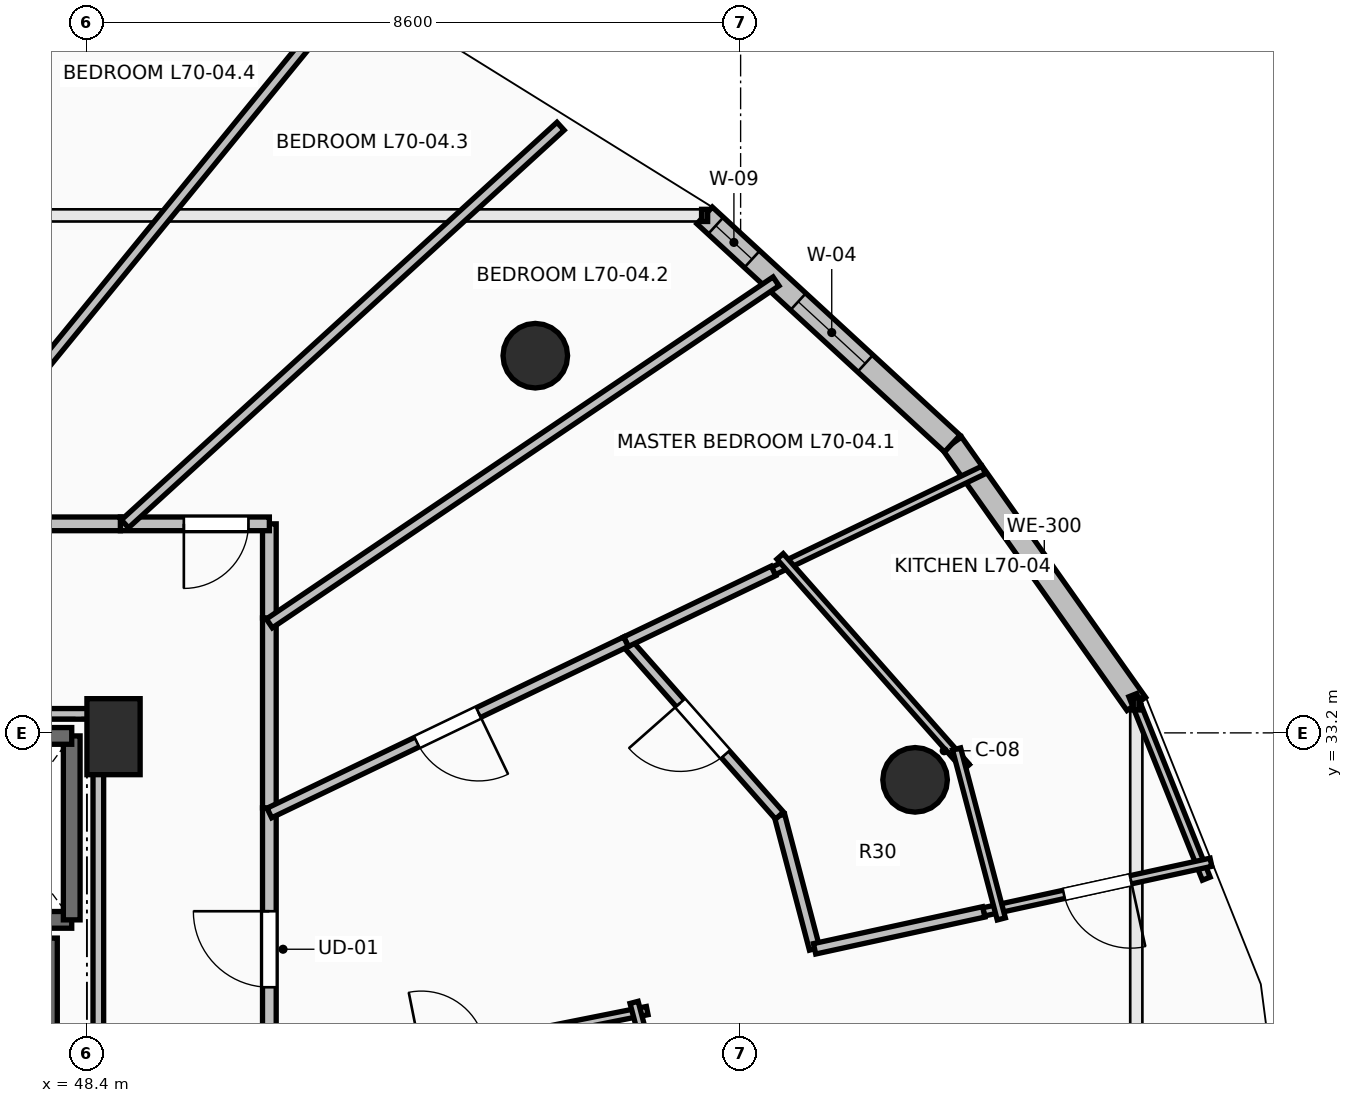
"""IFC4 building model, lengths in metres.
Left out: names, types, materials, properties, quantities, classifications, styles, units other than length and angle.
Written with IfcOpenShell. Run it as: python <this file> out.ifc"""

import sys

from ifc_helpers import new_model, si_unit, direction, frame, frame_2d, origin, origin_2d, place, context, subcontext, project, spatial, rectangle, circle, extrude, element, fill, save


model = new_model("IFC4")
c1 = context("Model", 3, precision=1e-05, world=origin(), true_north=direction((0.0, 1.0)))
c2 = subcontext(c1, "Body", "Model", "MODEL_VIEW")
j1 = project(units=[si_unit("LENGTHUNIT", "METRE"), si_unit("PLANEANGLEUNIT", "RADIAN")], contexts=[c1])
p1 = place(None, origin())
s1 = spatial("IfcSite", under=j1, at=p1, CompositionType="ELEMENT")
p2 = place(p1, origin())
s2 = spatial("IfcBuilding", under=s1, at=p2, CompositionType="ELEMENT")
p3 = place(p2, frame((0.0, 0.0, 259.1)))
s3 = spatial("IfcBuildingStorey", under=s2, at=p3, CompositionType="ELEMENT", Elevation=259.1)
for number, where, z_axis, x_axis in (
    (1, (59.295, 32.582, 0.0), (0.0, 0.0, 1.0), (0.924, 0.383, 0.0)),
    (2, (54.299, 38.162, 0.0), (0.0, 0.0, 1.0), (0.707, 0.707, 0.0)),
):
    element("IfcColumn", number, at=place(p3, frame(where, z_axis=z_axis, x_axis=x_axis)), inside=s3, PredefinedType="COLUMN", context=c2, shape_type="SweptSolid", body=[
        extrude(circle(Radius=0.425, at=origin_2d()), origin(), (0.0, 0.0, 1.0), 3.55),
    ])
p4 = place(p3, frame((48.75, 33.15, 0.0), z_axis=(0.0, 0.0, 1.0), x_axis=(1.0, 0.0, 0.0)))
e3 = element("IfcColumn", 3, at=p4, inside=s3, PredefinedType="PILASTER", context=c2, shape_type="SweptSolid", body=[
    extrude(rectangle(XDim=0.7, YDim=1.0, at=origin_2d()), origin(), (0.0, 0.0, 1.0), 3.55),
])
p5 = place(p3, frame((62.206, 33.581, 0.0), z_axis=(0.0, 0.0, 1.0), x_axis=(-0.577261247247, 0.816559521668, 0.0)))
e4 = element("IfcWall", 4, at=p5, inside=s3, PredefinedType="STANDARD", context=c2, shape_type="SweptSolid", body=[
    extrude(rectangle(XDim=4.194, YDim=0.3, at=frame_2d((2.097, 0.0))), origin(), (0.0, 0.0, 1.0), 3.29),
])
p6 = place(p3, frame((59.784, 37.006, 0.0), z_axis=(0.0, 0.0, 1.0), x_axis=(-0.735445373611, 0.677584018727, 0.0)))
e5 = element("IfcWall", 5, at=p6, inside=s3, PredefinedType="STANDARD", context=c2, shape_type="SweptSolid", body=[
    extrude(rectangle(XDim=4.43, YDim=0.3, at=frame_2d((2.215, 0.0))), origin(), (0.0, 0.0, 1.0), 3.29),
])
p7 = place(p6, frame((1.556, 0.0, 0.85)))
e6 = element("IfcOpeningElement", 6, at=p7, cuts=e5, PredefinedType="OPENING", context=c2, shape_type="SweptSolid", body=[
    extrude(rectangle(XDim=1.2, YDim=1.95, at=frame_2d((0.6, 0.975))), frame((0.0, 0.165, 0.0), z_axis=(0.0, -1.0, 0.0), x_axis=(1.0, 0.0, 0.0)), (0.0, 0.0, 1.0), 0.33),
])
p8 = place(p6, frame((3.581, 0.0, 0.85)))
e7 = element("IfcOpeningElement", 7, at=p8, cuts=e5, PredefinedType="OPENING", context=c2, shape_type="SweptSolid", body=[
    extrude(rectangle(XDim=0.65, YDim=1.8, at=frame_2d((0.325, 0.9))), frame((0.0, 0.165, 0.0), z_axis=(0.0, -1.0, 0.0), x_axis=(1.0, 0.0, 0.0)), (0.0, 0.0, 1.0), 0.33),
])
p9 = place(p3, frame((46.4, 30.74, 0.0), z_axis=(0.0, 0.0, 1.0), x_axis=(1.0, 0.0, 0.0)))
e8 = element("IfcWall", 8, at=p9, inside=s3, PredefinedType="SOLIDWALL", context=c2, shape_type="SweptSolid", body=[
    extrude(rectangle(XDim=1.8, YDim=0.22, at=frame_2d((0.9, 0.0))), origin(), (0.0, 0.0, 1.0), 3.29),
])
p10 = place(p3, frame((48.2, 30.74, 0.0), z_axis=(0.0, 0.0, 1.0), x_axis=(0.0, 1.0, 0.0)))
e9 = element("IfcWall", 9, at=p10, inside=s3, PredefinedType="SOLIDWALL", context=c2, shape_type="SweptSolid", body=[
    extrude(rectangle(XDim=2.42, YDim=0.22, at=frame_2d((1.21, 0.0))), origin(), (0.0, 0.0, 1.0), 3.29),
])
p11 = place(p3, frame((48.2, 33.16, 0.0), z_axis=(0.0, 0.0, 1.0), x_axis=(-1.0, 0.0, 0.0)))
e10 = element("IfcWall", 10, at=p11, inside=s3, PredefinedType="SOLIDWALL", context=c2, shape_type="SweptSolid", body=[
    extrude(rectangle(XDim=1.8, YDim=0.22, at=frame_2d((0.9, 0.0))), origin(), (0.0, 0.0, 1.0), 3.29),
])
p12 = place(p3, frame((47.9, 28.0, 0.0), z_axis=(0.0, 0.0, 1.0), x_axis=(0.0, 1.0, 0.0)))
e11 = element("IfcWall", 11, at=p12, inside=s3, PredefinedType="SHEAR", context=c2, shape_type="SweptSolid", body=[
    extrude(rectangle(XDim=2.5, YDim=0.22, at=frame_2d((1.25, 0.0))), origin(), (0.0, 0.0, 1.0), 3.29),
])
p13 = place(p3, frame((50.8, 28.494, 0.0), z_axis=(0.0, 0.0, 1.0), x_axis=(0.0, 1.0, 0.0)))
e12 = element("IfcWall", 12, at=p13, inside=s3, PredefinedType="PARTITIONING", context=c2, shape_type="SweptSolid", body=[
    extrude(rectangle(XDim=3.719, YDim=0.18, at=frame_2d((1.859, 0.0))), origin(), (0.0, 0.0, 1.0), 3.29),
])
p14 = place(p13, frame((1.36, 0.0, 0.0)))
e13 = element("IfcOpeningElement", 13, at=p14, cuts=e12, PredefinedType="OPENING", context=c2, shape_type="SweptSolid", body=[
    extrude(rectangle(XDim=1.0, YDim=2.15, at=frame_2d((0.5, 1.075))), frame((0.0, 0.105, 0.0), z_axis=(0.0, -1.0, 0.0), x_axis=(1.0, 0.0, 0.0)), (0.0, 0.0, 1.0), 0.21),
])
p15 = place(p3, frame((50.8, 32.213, 0.0), z_axis=(0.0, 0.0, 1.0), x_axis=(0.0, 1.0, 0.0)))
e14 = element("IfcWall", 14, at=p15, inside=s3, PredefinedType="PARTITIONING", context=c2, shape_type="SweptSolid", body=[
    extrude(rectangle(XDim=2.499, YDim=0.18, at=frame_2d((1.25, 0.0))), origin(), (0.0, 0.0, 1.0), 2.482),
])
p16 = place(p3, frame((50.8, 34.712, 0.0), z_axis=(0.0, 0.0, 1.0), x_axis=(0.0, 1.0, 0.0)))
e15 = element("IfcWall", 15, at=p16, inside=s3, PredefinedType="PARTITIONING", context=c2, shape_type="SweptSolid", body=[
    extrude(rectangle(XDim=1.238, YDim=0.18, at=frame_2d((0.619, 0.0))), origin(), (0.0, 0.0, 1.0), 2.482),
])
p17 = place(p3, frame((50.8, 35.95, 0.0), z_axis=(0.0, 0.0, 1.0), x_axis=(-1.0, 0.0, 0.0)))
e16 = element("IfcWall", 16, at=p17, inside=s3, PredefinedType="PARTITIONING", context=c2, shape_type="SweptSolid", body=[
    extrude(rectangle(XDim=1.96, YDim=0.18, at=frame_2d((0.98, 0.0))), origin(), (0.0, 0.0, 1.0), 2.936),
])
p18 = place(p17, frame((0.275, 0.0, 0.0)))
e17 = element("IfcOpeningElement", 17, at=p18, cuts=e16, PredefinedType="OPENING", context=c2, shape_type="SweptSolid", body=[
    extrude(rectangle(XDim=0.85, YDim=2.1, at=frame_2d((0.425, 1.05))), frame((0.0, 0.105, 0.0), z_axis=(0.0, -1.0, 0.0), x_axis=(1.0, 0.0, 0.0)), (0.0, 0.0, 1.0), 0.21),
])
p19 = place(p3, frame((48.84, 35.95, 0.0), z_axis=(0.0, 0.0, 1.0), x_axis=(-1.0, 0.0, 0.0)))
e18 = element("IfcWall", 18, at=p19, inside=s3, PredefinedType="PARTITIONING", context=c2, shape_type="SweptSolid", body=[
    extrude(rectangle(XDim=2.773, YDim=0.18, at=frame_2d((1.387, 0.0))), origin(), (0.0, 0.0, 1.0), 2.482),
])
p20 = place(p19, frame((0.961, 0.0, 0.0)))
e19 = element("IfcOpeningElement", 19, at=p20, cuts=e18, PredefinedType="OPENING", context=c2, shape_type="SweptSolid", body=[
    extrude(rectangle(XDim=0.85, YDim=2.1, at=frame_2d((0.425, 1.05))), frame((0.0, 0.105, 0.0), z_axis=(0.0, -1.0, 0.0), x_axis=(1.0, 0.0, 0.0)), (0.0, 0.0, 1.0), 0.21),
])
p21 = place(p3, frame((50.663, 28.527, 0.0), z_axis=(0.0, 0.0, 1.0), x_axis=(0.980652709614, 0.195755620935, 0.0)))
e20 = element("IfcWall", 20, at=p21, inside=s3, PredefinedType="PARTITIONING", context=c2, shape_type="SweptSolid", body=[
    extrude(rectangle(XDim=5.209, YDim=0.11, at=frame_2d((2.605, 0.0))), origin(), (0.0, 0.0, 1.0), 2.936),
])
p22 = place(p21, frame((2.18, 0.0, 0.0)))
e21 = element("IfcOpeningElement", 21, at=p22, cuts=e20, PredefinedType="OPENING", context=c2, shape_type="SweptSolid", body=[
    extrude(rectangle(XDim=0.85, YDim=2.1, at=frame_2d((0.425, 1.05))), frame((0.0, 0.07, 0.0), z_axis=(0.0, -1.0, 0.0), x_axis=(1.0, 0.0, 0.0)), (0.0, 0.0, 1.0), 0.14),
])
p23 = place(p3, frame((55.598, 29.654, 0.0), z_axis=(0.0, 0.0, 1.0), x_axis=(0.25449329928, -0.967074537263, 0.0)))
e22 = element("IfcWall", 22, at=p23, inside=s3, PredefinedType="PARTITIONING", context=c2, shape_type="SweptSolid", body=[
    extrude(rectangle(XDim=3.919, YDim=0.11, at=frame_2d((1.959, 0.0))), origin(), (0.0, 0.0, 1.0), 2.482),
])
p24 = place(p3, frame((57.432, 35.33, 0.0), z_axis=(0.0, 0.0, 1.0), x_axis=(0.90133305384, 0.43312668592, 0.0)))
e23 = element("IfcWall", 23, at=p24, inside=s3, PredefinedType="PARTITIONING", context=c2, shape_type="SweptSolid", body=[
    extrude(rectangle(XDim=3.069, YDim=0.11, at=frame_2d((1.535, 0.0))), origin(), (0.0, 0.0, 1.0), 3.29),
])
p25 = place(p3, frame((63.126, 31.282, 0.0), z_axis=(0.0, 0.0, 1.0), x_axis=(-0.371940924939, 0.92825640227, 0.0)))
e24 = element("IfcWall", 24, at=p25, inside=s3, PredefinedType="PARTITIONING", context=c2, shape_type="SweptSolid", body=[
    extrude(rectangle(XDim=2.601, YDim=0.11, at=frame_2d((1.3, 0.0))), origin(), (0.0, 0.0, 1.0), 3.29),
])
p26 = place(p3, frame((63.188, 31.498, 0.0), z_axis=(0.0, 0.0, 1.0), x_axis=(-0.976993096252, -0.213270930688, 0.0)))
e25 = element("IfcWall", 25, at=p26, inside=s3, PredefinedType="PARTITIONING", context=c2, shape_type="SweptSolid", body=[
    extrude(rectangle(XDim=3.06, YDim=0.11, at=frame_2d((1.53, 0.0))), origin(), (0.0, 0.0, 1.0), 3.29),
])
p27 = place(p26, frame((1.08, 0.0, 0.0)))
e26 = element("IfcOpeningElement", 26, at=p27, cuts=e25, PredefinedType="OPENING", context=c2, shape_type="SweptSolid", body=[
    extrude(rectangle(XDim=0.9, YDim=2.1, at=frame_2d((0.45, 1.05))), frame((0.0, 0.07, 0.0), z_axis=(0.0, -1.0, 0.0), x_axis=(1.0, 0.0, 0.0)), (0.0, 0.0, 1.0), 0.14),
])
p28 = place(p3, frame((57.973, 30.359, 0.0), z_axis=(0.0, 0.0, 1.0), x_axis=(-0.254274526126, 0.967132082687, 0.0)))
e27 = element("IfcWall", 27, at=p28, inside=s3, PredefinedType="PARTITIONING", context=c2, shape_type="SweptSolid", body=[
    extrude(rectangle(XDim=1.813, YDim=0.14, at=frame_2d((0.906, 0.0))), origin(), (0.0, 0.0, 1.0), 3.29),
])
p29 = place(p3, frame((57.512, 32.112, 0.0), z_axis=(0.0, 0.0, 1.0), x_axis=(-0.662026430628, 0.749480490173, 0.0)))
e28 = element("IfcWall", 28, at=p29, inside=s3, PredefinedType="PARTITIONING", context=c2, shape_type="SweptSolid", body=[
    extrude(rectangle(XDim=3.051, YDim=0.14, at=frame_2d((1.526, 0.0))), origin(), (0.0, 0.0, 1.0), 2.482),
])
p30 = place(p29, frame((1.076, 0.0, 0.0)))
e29 = element("IfcOpeningElement", 29, at=p30, cuts=e28, PredefinedType="OPENING", context=c2, shape_type="SweptSolid", body=[
    extrude(rectangle(XDim=0.9, YDim=2.1, at=frame_2d((0.45, 1.05))), frame((0.0, 0.085, 0.0), z_axis=(0.0, -1.0, 0.0), x_axis=(1.0, 0.0, 0.0)), (0.0, 0.0, 1.0), 0.17),
])
p31 = place(p3, frame((55.492, 34.399, 0.0), z_axis=(0.0, 0.0, 1.0), x_axis=(0.901372521065, 0.433044545363, 0.0)))
e30 = element("IfcWall", 30, at=p31, inside=s3, PredefinedType="PARTITIONING", context=c2, shape_type="SweptSolid", body=[
    extrude(rectangle(XDim=2.152, YDim=0.14, at=frame_2d((1.076, 0.0))), origin(), (0.0, 0.0, 1.0), 2.874),
])
p32 = place(p3, frame((60.198, 30.845, 0.0), z_axis=(0.0, 0.0, 1.0), x_axis=(-0.976965000645, -0.213399595862, 0.0)))
e31 = element("IfcWall", 31, at=p32, inside=s3, PredefinedType="PARTITIONING", context=c2, shape_type="SweptSolid", body=[
    extrude(rectangle(XDim=2.278, YDim=0.14, at=frame_2d((1.139, 0.0))), origin(), (0.0, 0.0, 1.0), 2.874),
])
p33 = place(p3, frame((55.492, 34.399, 0.0), z_axis=(0.0, 0.0, 1.0), x_axis=(-0.901416162018, -0.432953695968, 0.0)))
e32 = element("IfcWall", 32, at=p33, inside=s3, PredefinedType="PARTITIONING", context=c2, shape_type="SweptSolid", body=[
    extrude(rectangle(XDim=5.205, YDim=0.14, at=frame_2d((2.603, 0.0))), origin(), (0.0, 0.0, 1.0), 2.482),
])
p34 = place(p33, frame((2.152, 0.0, 0.0)))
e33 = element("IfcOpeningElement", 33, at=p34, cuts=e32, PredefinedType="OPENING", context=c2, shape_type="SweptSolid", body=[
    extrude(rectangle(XDim=0.9, YDim=2.1, at=frame_2d((0.45, 1.05))), frame((0.0, 0.085, 0.0), z_axis=(0.0, -1.0, 0.0), x_axis=(1.0, 0.0, 0.0)), (0.0, 0.0, 1.0), 0.17),
])
p35 = place(p3, frame((57.519, 35.522, 0.0), z_axis=(0.0, 0.0, 1.0), x_axis=(0.662055665853, -0.749454665281, 0.0)))
e34 = element("IfcWall", 34, at=p35, inside=s3, PredefinedType="PARTITIONING", context=c2, shape_type="SweptSolid", body=[
    extrude(rectangle(XDim=3.701, YDim=0.11, at=frame_2d((1.851, 0.0))), origin(), (0.0, 0.0, 1.0), 3.29),
])
p36 = place(p3, frame((59.841, 32.988, 0.0), z_axis=(0.0, 0.0, 1.0), x_axis=(0.254519291204, -0.967067696909, 0.0)))
e35 = element("IfcWall", 35, at=p36, inside=s3, PredefinedType="PARTITIONING", context=c2, shape_type="SweptSolid", body=[
    extrude(rectangle(XDim=2.312, YDim=0.11, at=frame_2d((1.156, 0.0))), origin(), (0.0, 0.0, 1.0), 3.29),
])
p37 = place(p3, frame((57.466, 39.14, 0.0), z_axis=(0.0, 0.0, 1.0), x_axis=(-0.828823335801, -0.559510391352, 0.0)))
e36 = element("IfcWall", 36, at=p37, inside=s3, PredefinedType="PARTITIONING", context=c2, shape_type="SweptSolid", body=[
    extrude(rectangle(XDim=8.043, YDim=0.14, at=frame_2d((4.021, 0.0))), origin(), (0.0, 0.0, 1.0), 2.482),
])
p38 = place(p3, frame((54.631, 41.181, 0.0), z_axis=(0.0, 0.0, 1.0), x_axis=(-0.73860604902, -0.674137303783, 0.0)))
e37 = element("IfcWall", 37, at=p38, inside=s3, PredefinedType="PARTITIONING", context=c2, shape_type="SweptSolid", body=[
    extrude(rectangle(XDim=7.76, YDim=0.14, at=frame_2d((3.88, 0.0))), origin(), (0.0, 0.0, 1.0), 2.874),
])
p39 = place(p3, frame((51.725, 42.804, 0.0), z_axis=(0.0, 0.0, 1.0), x_axis=(-0.632582563989, -0.774492930721, 0.0)))
e38 = element("IfcWall", 38, at=p39, inside=s3, PredefinedType="PARTITIONING", context=c2, shape_type="SweptSolid", body=[
    extrude(rectangle(XDim=8.85, YDim=0.14, at=frame_2d((4.425, 0.0))), origin(), (0.0, 0.0, 1.0), 2.482),
])
p40 = place(p3, frame((48.762, 44.004, 0.0), z_axis=(0.0, 0.0, 1.0), x_axis=(-0.51305247577, -0.858357243289, 0.0)))
e39 = element("IfcWall", 39, at=p40, inside=s3, PredefinedType="PARTITIONING", context=c2, shape_type="SweptSolid", body=[
    extrude(rectangle(XDim=9.383, YDim=0.14, at=frame_2d((4.691, 0.0))), origin(), (0.0, 0.0, 1.0), 2.482),
])
p41 = place(p3, frame((48.55, 28.196, 0.0), z_axis=(0.0, 0.0, 1.0), x_axis=(0.0, 1.0, 0.0)))
e40 = element("IfcWall", 40, at=p41, inside=s3, PredefinedType="PARTITIONING", context=c2, shape_type="SweptSolid", body=[
    extrude(rectangle(XDim=5.254, YDim=0.14, at=frame_2d((2.627, 0.0))), origin(), (0.0, 0.0, 1.0), 2.482),
])
p42 = place(p3, frame((48.55, 33.45, 0.0), z_axis=(0.0, 0.0, 1.0), x_axis=(-1.0, 0.0, 0.0)))
e41 = element("IfcWall", 41, at=p42, inside=s3, PredefinedType="PARTITIONING", context=c2, shape_type="SweptSolid", body=[
    extrude(rectangle(XDim=4.21, YDim=0.14, at=frame_2d((2.105, 0.0))), origin(), (0.0, 0.0, 1.0), 2.482),
])
p43 = place(p7, origin())
e42 = element("IfcWindow", 42, at=p43, inside=s3, PartitioningType="SINGLE_PANEL", PredefinedType="WINDOW", context=c2, shape_type="SweptSolid", body=[
    extrude(rectangle(XDim=1.2, YDim=1.95, at=frame_2d((0.6, 0.975))), frame((0.0, 0.03, 0.0), z_axis=(0.0, -1.0, 0.0), x_axis=(1.0, 0.0, 0.0)), (0.0, 0.0, 1.0), 0.06),
])
fill(e6, e42)
p44 = place(p8, origin())
e43 = element("IfcWindow", 43, at=p44, inside=s3, PartitioningType="SINGLE_PANEL", PredefinedType="WINDOW", context=c2, shape_type="SweptSolid", body=[
    extrude(rectangle(XDim=0.65, YDim=1.8, at=frame_2d((0.325, 0.9))), frame((0.0, 0.03, 0.0), z_axis=(0.0, -1.0, 0.0), x_axis=(1.0, 0.0, 0.0)), (0.0, 0.0, 1.0), 0.06),
])
fill(e7, e43)
p45 = place(p14, origin())
e44 = element("IfcDoor", 44, at=p45, inside=s3, OperationType="SINGLE_SWING_RIGHT", PredefinedType="DOOR", context=c2, shape_type="SweptSolid", body=[
    extrude(rectangle(XDim=1.0, YDim=2.15, at=frame_2d((0.5, 1.075))), frame((0.0, 0.025, 0.0), z_axis=(0.0, -1.0, 0.0), x_axis=(1.0, 0.0, 0.0)), (0.0, 0.0, 1.0), 0.05),
])
fill(e13, e44)
p46 = place(p27, origin())
e45 = element("IfcDoor", 45, at=p46, inside=s3, OperationType="SINGLE_SWING_LEFT", PredefinedType="DOOR", context=c2, shape_type="SweptSolid", body=[
    extrude(rectangle(XDim=0.9, YDim=2.1, at=frame_2d((0.45, 1.05))), frame((0.0, 0.025, 0.0), z_axis=(0.0, -1.0, 0.0), x_axis=(1.0, 0.0, 0.0)), (0.0, 0.0, 1.0), 0.05),
])
fill(e26, e45)
p47 = place(p30, origin())
e46 = element("IfcDoor", 46, at=p47, inside=s3, OperationType="SINGLE_SWING_RIGHT", PredefinedType="DOOR", context=c2, shape_type="SweptSolid", body=[
    extrude(rectangle(XDim=0.9, YDim=2.1, at=frame_2d((0.45, 1.05))), frame((0.0, 0.025, 0.0), z_axis=(0.0, -1.0, 0.0), x_axis=(1.0, 0.0, 0.0)), (0.0, 0.0, 1.0), 0.05),
])
fill(e29, e46)
p48 = place(p34, origin())
e47 = element("IfcDoor", 47, at=p48, inside=s3, OperationType="SINGLE_SWING_LEFT", PredefinedType="DOOR", context=c2, shape_type="SweptSolid", body=[
    extrude(rectangle(XDim=0.9, YDim=2.1, at=frame_2d((0.45, 1.05))), frame((0.0, 0.025, 0.0), z_axis=(0.0, -1.0, 0.0), x_axis=(1.0, 0.0, 0.0)), (0.0, 0.0, 1.0), 0.05),
])
fill(e33, e47)
p49 = place(p18, origin())
e48 = element("IfcDoor", 48, at=p49, inside=s3, OperationType="SINGLE_SWING_RIGHT", PredefinedType="DOOR", context=c2, shape_type="SweptSolid", body=[
    extrude(rectangle(XDim=0.85, YDim=2.1, at=frame_2d((0.425, 1.05))), frame((0.0, 0.025, 0.0), z_axis=(0.0, -1.0, 0.0), x_axis=(1.0, 0.0, 0.0)), (0.0, 0.0, 1.0), 0.05),
])
fill(e17, e48)
save(model, sys.argv[1])
